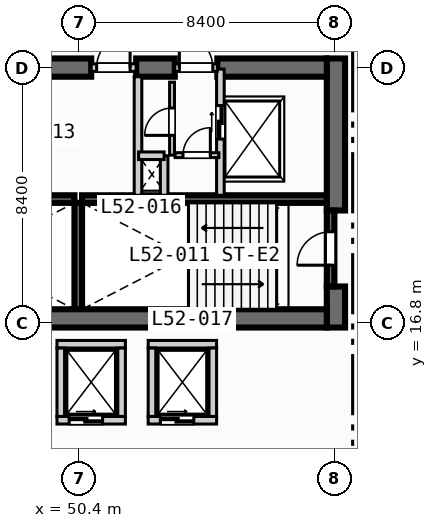
"""IFC4 building model, lengths in metres.
Left out: names, types, materials, properties, quantities, classifications, styles, units other than length and angle.
Written with IfcOpenShell. Run it as: python <this file> out.ifc"""

import sys

from ifc_helpers import new_model, si_unit, direction, frame, frame_2d, origin, place, context, subcontext, project, spatial, rectangle, extrude, element, fill, save


model = new_model("IFC4")
c1 = context("Model", 3, precision=1e-05, world=origin(), true_north=direction((0.0, 1.0)))
c2 = subcontext(c1, "Body", "Model", "MODEL_VIEW")
j1 = project(units=[si_unit("LENGTHUNIT", "METRE"), si_unit("PLANEANGLEUNIT", "RADIAN")], contexts=[c1])
p1 = place(None, origin())
s1 = spatial("IfcSite", under=j1, at=p1, CompositionType="ELEMENT")
p2 = place(p1, origin())
s2 = spatial("IfcBuilding", under=s1, at=p2, CompositionType="ELEMENT")
p3 = place(p2, frame((0.0, 0.0, 212.4)))
s3 = spatial("IfcBuildingStorey", under=s2, at=p3, CompositionType="ELEMENT", Elevation=212.4)
for number, where, z_axis, x_axis in (
    (1, (42.2, 20.875, 0.0), (0.0, 0.0, 1.0), (1.0, 0.0, 0.0)),
    (2, (50.5, 20.875, 0.0), (0.0, 0.0, 1.0), (1.0, 0.0, 0.0)),
):
    element("IfcWall", number, at=place(p3, frame(where, z_axis=z_axis, x_axis=x_axis)), inside=s3, PredefinedType="SOLIDWALL", context=c2, shape_type="SweptSolid", body=[
        extrude(rectangle(XDim=8.05, YDim=0.25, at=frame_2d((4.025, 0.0))), origin(), (0.0, 0.0, 1.0), 3.47),
    ])
p4 = place(p3, frame((50.375, 17.25, 0.0), z_axis=(0.0, 0.0, 1.0), x_axis=(0.0, 1.0, 0.0)))
e3 = element("IfcWall", 3, at=p4, inside=s3, PredefinedType="SOLIDWALL", context=c2, shape_type="SweptSolid", body=[
    extrude(rectangle(XDim=3.5, YDim=0.25, at=frame_2d((1.75, 0.0))), origin(), (0.0, 0.0, 1.0), 3.47),
])
p5 = place(p3, frame((58.85, 16.65, 0.0), z_axis=(0.0, 0.0, 1.0), x_axis=(0.0, 1.0, 0.0)))
e4 = element("IfcWall", 4, at=p5, inside=s3, PredefinedType="SHEAR", context=c2, shape_type="SweptSolid", body=[
    extrude(rectangle(XDim=1.35, YDim=0.6, at=frame_2d((0.675, 0.0))), origin(), (0.0, 0.0, 1.0), 3.47),
])
p6 = place(p3, frame((58.85, 20.5, 0.0), z_axis=(0.0, 0.0, 1.0), x_axis=(0.0, 1.0, 0.0)))
e5 = element("IfcWall", 5, at=p6, inside=s3, PredefinedType="SHEAR", context=c2, shape_type="SweptSolid", body=[
    extrude(rectangle(XDim=5.0, YDim=0.6, at=frame_2d((2.5, 0.0))), origin(), (0.0, 0.0, 1.0), 3.47),
])
p7 = place(p3, frame((42.2, 16.95, 0.0), z_axis=(0.0, 0.0, 1.0), x_axis=(1.0, 0.0, 0.0)))
e6 = element("IfcWall", 6, at=p7, inside=s3, PredefinedType="SHEAR", context=c2, shape_type="SweptSolid", body=[
    extrude(rectangle(XDim=16.35, YDim=0.6, at=frame_2d((8.175, 0.0))), origin(), (0.0, 0.0, 1.0), 3.47),
])
p8 = place(p3, frame((42.2, 25.2, 0.0), z_axis=(0.0, 0.0, 1.0), x_axis=(1.0, 0.0, 0.0)))
e7 = element("IfcWall", 7, at=p8, inside=s3, PredefinedType="SHEAR", context=c2, shape_type="SweptSolid", body=[
    extrude(rectangle(XDim=8.6, YDim=0.6, at=frame_2d((4.3, 0.0))), origin(), (0.0, 0.0, 1.0), 3.47),
])
p9 = place(p3, frame((52.28, 25.2, 0.0), z_axis=(0.0, 0.0, 1.0), x_axis=(1.0, 0.0, 0.0)))
e8 = element("IfcWall", 8, at=p9, inside=s3, PredefinedType="SHEAR", context=c2, shape_type="SweptSolid", body=[
    extrude(rectangle(XDim=1.27, YDim=0.6, at=frame_2d((0.635, 0.0))), origin(), (0.0, 0.0, 1.0), 3.47),
])
p10 = place(p3, frame((54.95, 25.2, 0.0), z_axis=(0.0, 0.0, 1.0), x_axis=(1.0, 0.0, 0.0)))
e9 = element("IfcWall", 9, at=p10, inside=s3, PredefinedType="SHEAR", context=c2, shape_type="SweptSolid", body=[
    extrude(rectangle(XDim=3.6, YDim=0.6, at=frame_2d((1.8, 0.0))), origin(), (0.0, 0.0, 1.0), 3.47),
])
p11 = place(p3, frame((58.675, 18.0, 0.0), z_axis=(0.0, 0.0, 1.0), x_axis=(0.0, 1.0, 0.0)))
e10 = element("IfcWall", 10, at=p11, inside=s3, PredefinedType="SOLIDWALL", context=c2, shape_type="SweptSolid", body=[
    extrude(rectangle(XDim=2.5, YDim=0.25, at=frame_2d((1.25, 0.0))), origin(), (0.0, 0.0, 1.0), 3.47),
])
p12 = place(p11, frame((0.7, 0.0, 0.0)))
e11 = element("IfcOpeningElement", 11, at=p12, cuts=e10, PredefinedType="OPENING", context=c2, shape_type="SweptSolid", body=[
    extrude(rectangle(XDim=1.1, YDim=2.15, at=frame_2d((0.55, 1.075))), frame((0.0, 0.135, 0.0), z_axis=(0.0, -1.0, 0.0), x_axis=(1.0, 0.0, 0.0)), (0.0, 0.0, 1.0), 0.27),
])
p13 = place(p3, frame((50.8, 25.2, 0.0), z_axis=(0.0, 0.0, 1.0), x_axis=(1.0, 0.0, 0.0)))
e12 = element("IfcWall", 12, at=p13, inside=s3, PredefinedType="SOLIDWALL", context=c2, shape_type="SweptSolid", body=[
    extrude(rectangle(XDim=1.48, YDim=0.25, at=frame_2d((0.74, 0.0))), origin(), (0.0, 0.0, 1.0), 3.47),
])
p14 = place(p13, frame((0.18, 0.0, 0.0)))
e13 = element("IfcOpeningElement", 13, at=p14, cuts=e12, PredefinedType="OPENING", context=c2, shape_type="SweptSolid", body=[
    extrude(rectangle(XDim=1.1, YDim=2.15, at=frame_2d((0.55, 1.075))), frame((0.0, 0.135, 0.0), z_axis=(0.0, -1.0, 0.0), x_axis=(1.0, 0.0, 0.0)), (0.0, 0.0, 1.0), 0.27),
])
p15 = place(p3, frame((52.34, 21.0, 0.0), z_axis=(0.0, 0.0, 1.0), x_axis=(0.0, 1.0, 0.0)))
e14 = element("IfcWall", 14, at=p15, inside=s3, PredefinedType="SOLIDWALL", context=c2, shape_type="SweptSolid", body=[
    extrude(rectangle(XDim=3.9, YDim=0.25, at=frame_2d((1.95, 0.0))), origin(), (0.0, 0.0, 1.0), 3.47),
])
p16 = place(p3, frame((55.05, 21.0, 0.0), z_axis=(0.0, 0.0, 1.0), x_axis=(0.0, 1.0, 0.0)))
e15 = element("IfcWall", 15, at=p16, inside=s3, PredefinedType="SOLIDWALL", context=c2, shape_type="SweptSolid", body=[
    extrude(rectangle(XDim=4.15, YDim=0.25, at=frame_2d((2.075, 0.0))), origin(), (0.0, 0.0, 1.0), 3.47),
])
p17 = place(p16, frame((1.85, 0.0, 0.0)))
e16 = element("IfcOpeningElement", 16, at=p17, cuts=e15, PredefinedType="OPENING", context=c2, shape_type="SweptSolid", body=[
    extrude(rectangle(XDim=1.1, YDim=2.15, at=frame_2d((0.55, 1.075))), frame((0.0, 0.135, 0.0), z_axis=(0.0, -1.0, 0.0), x_axis=(1.0, 0.0, 0.0)), (0.0, 0.0, 1.0), 0.27),
])
p18 = place(p3, frame((53.55, 25.2, 0.0), z_axis=(0.0, 0.0, 1.0), x_axis=(1.0, 0.0, 0.0)))
e17 = element("IfcWall", 17, at=p18, inside=s3, PredefinedType="SOLIDWALL", context=c2, shape_type="SweptSolid", body=[
    extrude(rectangle(XDim=1.4, YDim=0.25, at=frame_2d((0.7, 0.0))), origin(), (0.0, 0.0, 1.0), 3.47),
])
p19 = place(p18, frame((0.15, 0.0, 0.0)))
e18 = element("IfcOpeningElement", 18, at=p19, cuts=e17, PredefinedType="OPENING", context=c2, shape_type="SweptSolid", body=[
    extrude(rectangle(XDim=1.1, YDim=2.15, at=frame_2d((0.55, 1.075))), frame((0.0, 0.135, 0.0), z_axis=(0.0, -1.0, 0.0), x_axis=(1.0, 0.0, 0.0)), (0.0, 0.0, 1.0), 0.27),
])
p20 = place(p3, frame((53.2, 21.0, 0.0), z_axis=(0.0, 0.0, 1.0), x_axis=(0.0, 1.0, 0.0)))
e19 = element("IfcWall", 19, at=p20, inside=s3, PredefinedType="SOLIDWALL", context=c2, shape_type="SweptSolid", body=[
    extrude(rectangle(XDim=1.3, YDim=0.25, at=frame_2d((0.65, 0.0))), origin(), (0.0, 0.0, 1.0), 3.47),
])
p21 = place(p3, frame((52.36, 22.3, 0.0), z_axis=(0.0, 0.0, 1.0), x_axis=(1.0, 0.0, 0.0)))
e20 = element("IfcWall", 20, at=p21, inside=s3, PredefinedType="SOLIDWALL", context=c2, shape_type="SweptSolid", body=[
    extrude(rectangle(XDim=0.84, YDim=0.25, at=frame_2d((0.42, 0.0))), origin(), (0.0, 0.0, 1.0), 3.47),
])
p22 = place(p3, frame((53.56, 22.32, 0.0), z_axis=(0.0, 0.0, 1.0), x_axis=(1.0, 0.0, 0.0)))
e21 = element("IfcWall", 21, at=p22, inside=s3, PredefinedType="PARTITIONING", context=c2, shape_type="SweptSolid", body=[
    extrude(rectangle(XDim=1.44, YDim=0.16, at=frame_2d((0.72, 0.0))), origin(), (0.0, 0.0, 1.0), 3.47),
])
p23 = place(p22, frame((0.26, 0.0, 0.0)))
e22 = element("IfcOpeningElement", 22, at=p23, cuts=e21, PredefinedType="OPENING", context=c2, shape_type="SweptSolid", body=[
    extrude(rectangle(XDim=0.9, YDim=2.1, at=frame_2d((0.45, 1.05))), frame((0.0, 0.09, 0.0), z_axis=(0.0, -1.0, 0.0), x_axis=(1.0, 0.0, 0.0)), (0.0, 0.0, 1.0), 0.18),
])
p24 = place(p3, frame((53.46, 22.32, 0.0), z_axis=(0.0, 0.0, 1.0), x_axis=(0.0, 1.0, 0.0)))
e23 = element("IfcWall", 23, at=p24, inside=s3, PredefinedType="PARTITIONING", context=c2, shape_type="SweptSolid", body=[
    extrude(rectangle(XDim=2.4, YDim=0.16, at=frame_2d((1.2, 0.0))), origin(), (0.0, 0.0, 1.0), 3.47),
])
p25 = place(p24, frame((0.65, 0.0, 0.0)))
e24 = element("IfcOpeningElement", 24, at=p25, cuts=e23, PredefinedType="OPENING", context=c2, shape_type="SweptSolid", body=[
    extrude(rectangle(XDim=0.9, YDim=2.1, at=frame_2d((0.45, 1.05))), frame((0.0, 0.09, 0.0), z_axis=(0.0, -1.0, 0.0), x_axis=(1.0, 0.0, 0.0)), (0.0, 0.0, 1.0), 0.18),
])
p26 = place(p3, frame((49.675, 13.6, 0.0), z_axis=(0.0, 0.0, 1.0), x_axis=(1.0, 0.0, 0.0)))
e25 = element("IfcWall", 25, at=p26, inside=s3, PredefinedType="SOLIDWALL", context=c2, shape_type="SweptSolid", body=[
    extrude(rectangle(XDim=2.25, YDim=0.25, at=frame_2d((1.125, 0.0))), origin(), (0.0, 0.0, 1.0), 3.47),
])
p27 = place(p26, frame((0.4, 0.0, 0.0)))
e26 = element("IfcOpeningElement", 26, at=p27, cuts=e25, PredefinedType="OPENING", context=c2, shape_type="SweptSolid", body=[
    extrude(rectangle(XDim=1.1, YDim=2.15, at=frame_2d((0.55, 1.075))), frame((0.0, 0.135, 0.0), z_axis=(0.0, -1.0, 0.0), x_axis=(1.0, 0.0, 0.0)), (0.0, 0.0, 1.0), 0.27),
])
for number, where, z_axis, x_axis in (
    (27, (49.675, 16.1, 0.0), (0.0, 0.0, 1.0), (1.0, 0.0, 0.0)),
    (28, (49.8, 13.725, 0.0), (0.0, 0.0, 1.0), (0.0, 1.0, 0.0)),
    (29, (51.8, 13.725, 0.0), (0.0, 0.0, 1.0), (0.0, 1.0, 0.0)),
):
    element("IfcWall", number, at=place(p3, frame(where, z_axis=z_axis, x_axis=x_axis)), inside=s3, PredefinedType="SOLIDWALL", context=c2, shape_type="SweptSolid", body=[
        extrude(rectangle(XDim=2.25, YDim=0.25, at=frame_2d((1.125, 0.0))), origin(), (0.0, 0.0, 1.0), 3.47),
    ])
p28 = place(p3, frame((52.675, 13.6, 0.0), z_axis=(0.0, 0.0, 1.0), x_axis=(1.0, 0.0, 0.0)))
e30 = element("IfcWall", 30, at=p28, inside=s3, PredefinedType="SOLIDWALL", context=c2, shape_type="SweptSolid", body=[
    extrude(rectangle(XDim=2.25, YDim=0.25, at=frame_2d((1.125, 0.0))), origin(), (0.0, 0.0, 1.0), 3.47),
])
p29 = place(p28, frame((0.4, 0.0, 0.0)))
e31 = element("IfcOpeningElement", 31, at=p29, cuts=e30, PredefinedType="OPENING", context=c2, shape_type="SweptSolid", body=[
    extrude(rectangle(XDim=1.1, YDim=2.15, at=frame_2d((0.55, 1.075))), frame((0.0, 0.135, 0.0), z_axis=(0.0, -1.0, 0.0), x_axis=(1.0, 0.0, 0.0)), (0.0, 0.0, 1.0), 0.27),
])
for number, where, z_axis, x_axis in (
    (32, (52.675, 16.1, 0.0), (0.0, 0.0, 1.0), (1.0, 0.0, 0.0)),
    (33, (52.8, 13.725, 0.0), (0.0, 0.0, 1.0), (0.0, 1.0, 0.0)),
    (34, (54.8, 13.725, 0.0), (0.0, 0.0, 1.0), (0.0, 1.0, 0.0)),
):
    element("IfcWall", number, at=place(p3, frame(where, z_axis=z_axis, x_axis=x_axis)), inside=s3, PredefinedType="SOLIDWALL", context=c2, shape_type="SweptSolid", body=[
        extrude(rectangle(XDim=2.25, YDim=0.25, at=frame_2d((1.125, 0.0))), origin(), (0.0, 0.0, 1.0), 3.47),
    ])
p30 = place(p12, origin())
e35 = element("IfcDoor", 35, at=p30, inside=s3, OperationType="SINGLE_SWING_LEFT", PredefinedType="DOOR", context=c2, shape_type="SweptSolid", body=[
    extrude(rectangle(XDim=1.1, YDim=2.15, at=frame_2d((0.55, 1.075))), frame((0.0, 0.025, 0.0), z_axis=(0.0, -1.0, 0.0), x_axis=(1.0, 0.0, 0.0)), (0.0, 0.0, 1.0), 0.05),
])
fill(e11, e35)
p31 = place(p14, origin())
e36 = element("IfcDoor", 36, at=p31, inside=s3, OperationType="SINGLE_SWING_RIGHT", PredefinedType="DOOR", context=c2, shape_type="SweptSolid", body=[
    extrude(rectangle(XDim=1.1, YDim=2.15, at=frame_2d((0.55, 1.075))), frame((0.0, 0.025, 0.0), z_axis=(0.0, -1.0, 0.0), x_axis=(1.0, 0.0, 0.0)), (0.0, 0.0, 1.0), 0.05),
])
fill(e13, e36)
p32 = place(p17, origin())
e37 = element("IfcDoor", 37, at=p32, inside=s3, OperationType="SLIDING_TO_LEFT", PredefinedType="DOOR", context=c2, shape_type="SweptSolid", body=[
    extrude(rectangle(XDim=1.1, YDim=2.15, at=frame_2d((0.55, 1.075))), frame((0.0, 0.025, 0.0), z_axis=(0.0, -1.0, 0.0), x_axis=(1.0, 0.0, 0.0)), (0.0, 0.0, 1.0), 0.05),
])
fill(e16, e37)
p33 = place(p19, origin())
e38 = element("IfcDoor", 38, at=p33, inside=s3, OperationType="SINGLE_SWING_LEFT", PredefinedType="DOOR", context=c2, shape_type="SweptSolid", body=[
    extrude(rectangle(XDim=1.1, YDim=2.15, at=frame_2d((0.55, 1.075))), frame((0.0, 0.025, 0.0), z_axis=(0.0, -1.0, 0.0), x_axis=(1.0, 0.0, 0.0)), (0.0, 0.0, 1.0), 0.05),
])
fill(e18, e38)
p34 = place(p23, origin())
e39 = element("IfcDoor", 39, at=p34, inside=s3, OperationType="SINGLE_SWING_RIGHT", PredefinedType="DOOR", context=c2, shape_type="SweptSolid", body=[
    extrude(rectangle(XDim=0.9, YDim=2.1, at=frame_2d((0.45, 1.05))), frame((0.0, 0.025, 0.0), z_axis=(0.0, -1.0, 0.0), x_axis=(1.0, 0.0, 0.0)), (0.0, 0.0, 1.0), 0.05),
])
fill(e22, e39)
p35 = place(p25, origin())
e40 = element("IfcDoor", 40, at=p35, inside=s3, OperationType="SINGLE_SWING_LEFT", PredefinedType="DOOR", context=c2, shape_type="SweptSolid", body=[
    extrude(rectangle(XDim=0.9, YDim=2.1, at=frame_2d((0.45, 1.05))), frame((0.0, 0.025, 0.0), z_axis=(0.0, -1.0, 0.0), x_axis=(1.0, 0.0, 0.0)), (0.0, 0.0, 1.0), 0.05),
])
fill(e24, e40)
p36 = place(p27, origin())
e41 = element("IfcDoor", 41, at=p36, inside=s3, OperationType="SLIDING_TO_LEFT", PredefinedType="DOOR", context=c2, shape_type="SweptSolid", body=[
    extrude(rectangle(XDim=1.1, YDim=2.15, at=frame_2d((0.55, 1.075))), frame((0.0, 0.025, 0.0), z_axis=(0.0, -1.0, 0.0), x_axis=(1.0, 0.0, 0.0)), (0.0, 0.0, 1.0), 0.05),
])
fill(e26, e41)
p37 = place(p29, origin())
e42 = element("IfcDoor", 42, at=p37, inside=s3, OperationType="SLIDING_TO_LEFT", PredefinedType="DOOR", context=c2, shape_type="SweptSolid", body=[
    extrude(rectangle(XDim=1.1, YDim=2.15, at=frame_2d((0.55, 1.075))), frame((0.0, 0.025, 0.0), z_axis=(0.0, -1.0, 0.0), x_axis=(1.0, 0.0, 0.0)), (0.0, 0.0, 1.0), 0.05),
])
fill(e31, e42)
save(model, sys.argv[1])
